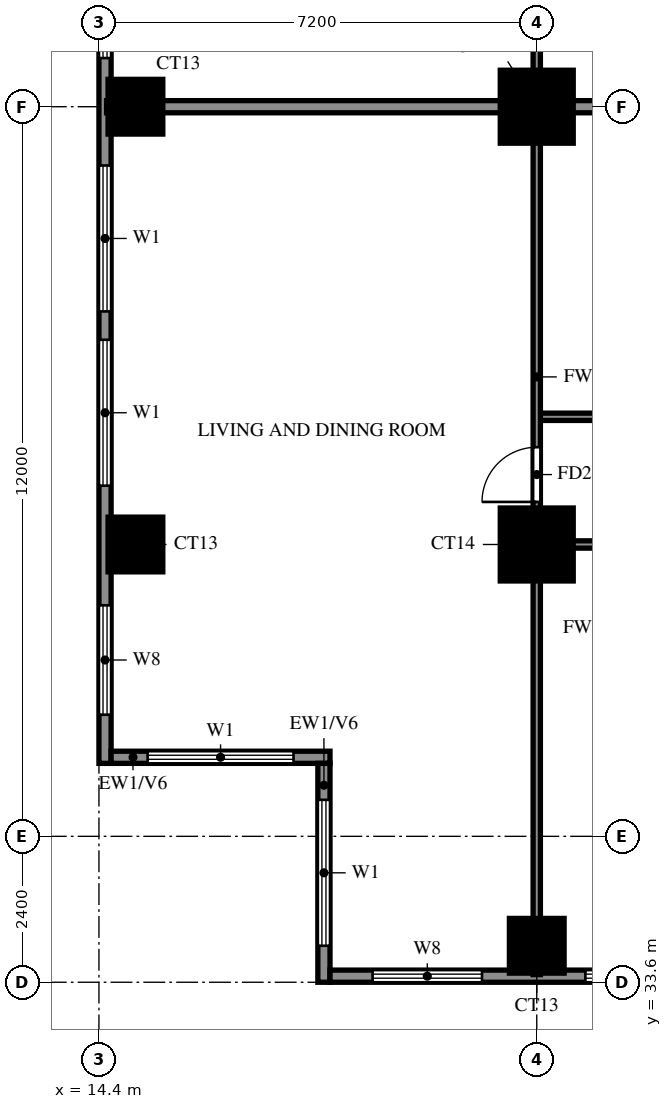
"""IFC4 building model, lengths in metres.
Left out: names, types, materials, properties, quantities, classifications, styles, units other than length and angle.
Written with IfcOpenShell. Run it as: python <this file> out.ifc"""

import sys

from ifc_helpers import new_model, si_unit, direction, frame, frame_2d, origin, origin_2d, place, context, subcontext, project, spatial, rectangle, extrude, source, transform, mapped, element, fill, save


model = new_model("IFC4")
c1 = context("Model", 3, precision=1e-05, world=origin(), true_north=direction((0.0, 1.0)))
c2 = subcontext(c1, "Body", "Model", "MODEL_VIEW")
j1 = project(units=[si_unit("LENGTHUNIT", "METRE"), si_unit("PLANEANGLEUNIT", "RADIAN")], contexts=[c1])
p1 = place(None, origin())
s1 = spatial("IfcSite", under=j1, at=p1, CompositionType="ELEMENT")
p2 = place(p1, origin())
s2 = spatial("IfcBuilding", under=s1, at=p2, CompositionType="ELEMENT")
p3 = place(p2, frame((0.0, 0.0, 104.0)))
s3 = spatial("IfcBuildingStorey", under=s2, at=p3, CompositionType="ELEMENT", Elevation=104.0)
m1 = source(origin(), c2, "Body", "SweptSolid", [
    extrude(rectangle(XDim=0.9, YDim=0.9, at=origin_2d()), origin(), (0.0, 0.0, 1.0), 3.1),
])
for number, where, z_axis, x_axis in (
    (1, (21.6, 34.2, 0.0), (0.0, 0.0, 1.0), (1.0, 0.0, 0.0)),
    (2, (15.0, 40.8, 0.0), (0.0, 0.0, 1.0), (1.0, 0.0, 0.0)),
):
    element("IfcColumn", number, at=place(p3, frame(where, z_axis=z_axis, x_axis=x_axis)), inside=s3, PredefinedType="COLUMN", context=c2, shape_type="MappedRepresentation", body=[
        mapped(m1, transform((0.0, 0.0, 0.0))),
    ])
m2 = source(origin(), c2, "Body", "SweptSolid", [
    extrude(rectangle(XDim=1.2, YDim=1.2, at=origin_2d()), origin(), (0.0, 0.0, 1.0), 3.1),
])
p4 = place(p3, frame((21.6, 40.8, 0.0), z_axis=(0.0, 0.0, 1.0), x_axis=(1.0, 0.0, 0.0)))
e3 = element("IfcColumn", 3, at=p4, inside=s3, PredefinedType="COLUMN", context=c2, shape_type="MappedRepresentation", body=[
    mapped(m2, transform((0.0, 0.0, 0.0))),
])
p5 = place(p3, frame((15.0, 48.0, 0.0), z_axis=(0.0, 0.0, 1.0), x_axis=(1.0, 0.0, 0.0)))
e4 = element("IfcColumn", 4, at=p5, inside=s3, PredefinedType="COLUMN", context=c2, shape_type="MappedRepresentation", body=[
    mapped(m1, transform((0.0, 0.0, 0.0))),
])
p6 = place(p3, frame((21.6, 48.0, 0.0), z_axis=(0.0, 0.0, 1.0), x_axis=(1.0, 0.0, 0.0)))
e5 = element("IfcColumn", 5, at=p6, inside=s3, PredefinedType="COLUMN", context=c2, shape_type="MappedRepresentation", body=[
    mapped(m2, transform((0.0, 0.0, 0.0))),
])
p7 = place(p3, frame((14.5, 76.6, 0.0), z_axis=(0.0, 0.0, 1.0), x_axis=(0.0, -1.0, 0.0)))
e6 = element("IfcWall", 6, at=p7, inside=s3, PredefinedType="SOLIDWALL", context=c2, shape_type="SweptSolid", body=[
    extrude(rectangle(XDim=39.4, YDim=0.2, at=frame_2d((19.7, 0.0))), origin(), (0.0, 0.0, 1.0), 3.1),
])
p8 = place(p7, frame((7.9, 0.0, 0.0)))
e7 = element("IfcOpeningElement", 7, at=p8, cuts=e6, PredefinedType="OPENING", context=c2, shape_type="SweptSolid", body=[
    extrude(rectangle(XDim=1.8, YDim=2.4, at=frame_2d((0.9, 1.2))), frame((0.0, 0.11, 0.0), z_axis=(0.0, -1.0, 0.0), x_axis=(1.0, 0.0, 0.0)), (0.0, 0.0, 1.0), 0.22),
])
p9 = place(p7, frame((29.567, 0.0, 0.6)))
e8 = element("IfcOpeningElement", 8, at=p9, cuts=e6, PredefinedType="OPENING", context=c2, shape_type="SweptSolid", body=[
    extrude(rectangle(XDim=2.4, YDim=2.4, at=frame_2d((1.2, 1.2))), frame((0.0, 0.11, 0.0), z_axis=(0.0, -1.0, 0.0), x_axis=(1.0, 0.0, 0.0)), (0.0, 0.0, 1.0), 0.22),
])
p10 = place(p7, frame((32.433, 0.0, 0.6)))
e9 = element("IfcOpeningElement", 9, at=p10, cuts=e6, PredefinedType="OPENING", context=c2, shape_type="SweptSolid", body=[
    extrude(rectangle(XDim=2.4, YDim=2.4, at=frame_2d((1.2, 1.2))), frame((0.0, 0.11, 0.0), z_axis=(0.0, -1.0, 0.0), x_axis=(1.0, 0.0, 0.0)), (0.0, 0.0, 1.0), 0.22),
])
p11 = place(p7, frame((36.8, 0.0, 0.6)))
e10 = element("IfcOpeningElement", 10, at=p11, cuts=e6, PredefinedType="OPENING", context=c2, shape_type="SweptSolid", body=[
    extrude(rectangle(XDim=1.8, YDim=2.4, at=frame_2d((0.9, 1.2))), frame((0.0, 0.11, 0.0), z_axis=(0.0, -1.0, 0.0), x_axis=(1.0, 0.0, 0.0)), (0.0, 0.0, 1.0), 0.22),
])
p12 = place(p7, frame((25.4, 0.0, 0.6)))
e11 = element("IfcOpeningElement", 11, at=p12, cuts=e6, PredefinedType="OPENING", context=c2, shape_type="SweptSolid", body=[
    extrude(rectangle(XDim=2.4, YDim=2.4, at=frame_2d((1.2, 1.2))), frame((0.0, 0.11, 0.0), z_axis=(0.0, -1.0, 0.0), x_axis=(1.0, 0.0, 0.0)), (0.0, 0.0, 1.0), 0.22),
])
p13 = place(p7, frame((22.95, 0.0, 1.5)))
e12 = element("IfcOpeningElement", 12, at=p13, cuts=e6, PredefinedType="OPENING", context=c2, shape_type="SweptSolid", body=[
    extrude(rectangle(XDim=0.9, YDim=0.9, at=frame_2d((0.45, 0.45))), frame((0.0, 0.11, 0.0), z_axis=(0.0, -1.0, 0.0), x_axis=(1.0, 0.0, 0.0)), (0.0, 0.0, 1.0), 0.22),
])
p14 = place(p7, frame((15.167, 0.0, 0.6)))
e13 = element("IfcOpeningElement", 13, at=p14, cuts=e6, PredefinedType="OPENING", context=c2, shape_type="SweptSolid", body=[
    extrude(rectangle(XDim=2.4, YDim=2.4, at=frame_2d((1.2, 1.2))), frame((0.0, 0.11, 0.0), z_axis=(0.0, -1.0, 0.0), x_axis=(1.0, 0.0, 0.0)), (0.0, 0.0, 1.0), 0.22),
])
p15 = place(p7, frame((18.033, 0.0, 0.6)))
e14 = element("IfcOpeningElement", 14, at=p15, cuts=e6, PredefinedType="OPENING", context=c2, shape_type="SweptSolid", body=[
    extrude(rectangle(XDim=2.4, YDim=2.4, at=frame_2d((1.2, 1.2))), frame((0.0, 0.11, 0.0), z_axis=(0.0, -1.0, 0.0), x_axis=(1.0, 0.0, 0.0)), (0.0, 0.0, 1.0), 0.22),
])
p16 = place(p7, frame((11.9, 0.0, 0.6)))
e15 = element("IfcOpeningElement", 15, at=p16, cuts=e6, PredefinedType="OPENING", context=c2, shape_type="SweptSolid", body=[
    extrude(rectangle(XDim=1.8, YDim=2.4, at=frame_2d((0.9, 1.2))), frame((0.0, 0.11, 0.0), z_axis=(0.0, -1.0, 0.0), x_axis=(1.0, 0.0, 0.0)), (0.0, 0.0, 1.0), 0.22),
])
p17 = place(p7, frame((3.55, 0.0, 1.5)))
e16 = element("IfcOpeningElement", 16, at=p17, cuts=e6, PredefinedType="OPENING", context=c2, shape_type="SweptSolid", body=[
    extrude(rectangle(XDim=0.9, YDim=0.9, at=frame_2d((0.45, 0.45))), frame((0.0, 0.11, 0.0), z_axis=(0.0, -1.0, 0.0), x_axis=(1.0, 0.0, 0.0)), (0.0, 0.0, 1.0), 0.22),
])
p18 = place(p7, frame((5.45, 0.0, 1.5)))
e17 = element("IfcOpeningElement", 17, at=p18, cuts=e6, PredefinedType="OPENING", context=c2, shape_type="SweptSolid", body=[
    extrude(rectangle(XDim=0.9, YDim=0.9, at=frame_2d((0.45, 0.45))), frame((0.0, 0.11, 0.0), z_axis=(0.0, -1.0, 0.0), x_axis=(1.0, 0.0, 0.0)), (0.0, 0.0, 1.0), 0.22),
])
p19 = place(p7, frame((0.6, 0.0, 0.6)))
e18 = element("IfcOpeningElement", 18, at=p19, cuts=e6, PredefinedType="OPENING", context=c2, shape_type="SweptSolid", body=[
    extrude(rectangle(XDim=2.4, YDim=2.4, at=frame_2d((1.2, 1.2))), frame((0.0, 0.11, 0.0), z_axis=(0.0, -1.0, 0.0), x_axis=(1.0, 0.0, 0.0)), (0.0, 0.0, 1.0), 0.22),
])
p20 = place(p3, frame((14.6, 37.3, 0.0), z_axis=(0.0, 0.0, 1.0), x_axis=(1.0, 0.0, 0.0)))
e19 = element("IfcWall", 19, at=p20, inside=s3, PredefinedType="SOLIDWALL", context=c2, shape_type="SweptSolid", body=[
    extrude(rectangle(XDim=3.6, YDim=0.2, at=frame_2d((1.8, 0.0))), origin(), (0.0, 0.0, 1.0), 3.1),
])
p21 = place(p20, frame((0.6, 0.0, 0.6)))
e20 = element("IfcOpeningElement", 20, at=p21, cuts=e19, PredefinedType="OPENING", context=c2, shape_type="SweptSolid", body=[
    extrude(rectangle(XDim=2.4, YDim=2.4, at=frame_2d((1.2, 1.2))), frame((0.0, 0.11, 0.0), z_axis=(0.0, -1.0, 0.0), x_axis=(1.0, 0.0, 0.0)), (0.0, 0.0, 1.0), 0.22),
])
p22 = place(p3, frame((18.1, 37.2, 0.0), z_axis=(0.0, 0.0, 1.0), x_axis=(0.0, -1.0, 0.0)))
e21 = element("IfcWall", 21, at=p22, inside=s3, PredefinedType="SOLIDWALL", context=c2, shape_type="SweptSolid", body=[
    extrude(rectangle(XDim=3.6, YDim=0.2, at=frame_2d((1.8, 0.0))), origin(), (0.0, 0.0, 1.0), 3.1),
])
p23 = place(p22, frame((0.6, 0.0, 0.6)))
e22 = element("IfcOpeningElement", 22, at=p23, cuts=e21, PredefinedType="OPENING", context=c2, shape_type="SweptSolid", body=[
    extrude(rectangle(XDim=2.4, YDim=2.4, at=frame_2d((1.2, 1.2))), frame((0.0, 0.11, 0.0), z_axis=(0.0, -1.0, 0.0), x_axis=(1.0, 0.0, 0.0)), (0.0, 0.0, 1.0), 0.22),
])
p24 = place(p3, frame((18.2, 33.7, 0.0), z_axis=(0.0, 0.0, 1.0), x_axis=(1.0, 0.0, 0.0)))
e23 = element("IfcWall", 23, at=p24, inside=s3, PredefinedType="SOLIDWALL", context=c2, shape_type="SweptSolid", body=[
    extrude(rectangle(XDim=10.6, YDim=0.2, at=frame_2d((5.3, 0.0))), origin(), (0.0, 0.0, 1.0), 3.1),
])
p25 = place(p24, frame((0.7, 0.0, 0.6)))
e24 = element("IfcOpeningElement", 24, at=p25, cuts=e23, PredefinedType="OPENING", context=c2, shape_type="SweptSolid", body=[
    extrude(rectangle(XDim=1.8, YDim=2.4, at=frame_2d((0.9, 1.2))), frame((0.0, 0.11, 0.0), z_axis=(0.0, -1.0, 0.0), x_axis=(1.0, 0.0, 0.0)), (0.0, 0.0, 1.0), 0.22),
])
p26 = place(p24, frame((4.2, 0.0, 0.6)))
e25 = element("IfcOpeningElement", 25, at=p26, cuts=e23, PredefinedType="OPENING", context=c2, shape_type="SweptSolid", body=[
    extrude(rectangle(XDim=2.4, YDim=2.4, at=frame_2d((1.2, 1.2))), frame((0.0, 0.11, 0.0), z_axis=(0.0, -1.0, 0.0), x_axis=(1.0, 0.0, 0.0)), (0.0, 0.0, 1.0), 0.22),
])
p27 = place(p24, frame((8.15, 0.0, 1.5)))
e26 = element("IfcOpeningElement", 26, at=p27, cuts=e23, PredefinedType="OPENING", context=c2, shape_type="SweptSolid", body=[
    extrude(rectangle(XDim=0.9, YDim=0.9, at=frame_2d((0.45, 0.45))), frame((0.0, 0.11, 0.0), z_axis=(0.0, -1.0, 0.0), x_axis=(1.0, 0.0, 0.0)), (0.0, 0.0, 1.0), 0.22),
])
p28 = place(p3, frame((14.525, 48.0, 0.0), z_axis=(0.0, 0.0, 1.0), x_axis=(1.0, 0.0, 0.0)))
e27 = element("IfcWall", 27, at=p28, inside=s3, PredefinedType="SOLIDWALL", context=c2, shape_type="SweptSolid", body=[
    extrude(rectangle(XDim=19.075, YDim=0.2, at=frame_2d((9.538, 0.0))), origin(), (0.0, 0.0, 1.0), 3.1),
])
p29 = place(p3, frame((21.6, 40.8, 0.0), z_axis=(0.0, 0.0, 1.0), x_axis=(1.0, 0.0, 0.0)))
e28 = element("IfcWall", 28, at=p29, inside=s3, PredefinedType="PARTITIONING", context=c2, shape_type="SweptSolid", body=[
    extrude(rectangle(XDim=3.6, YDim=0.12, at=frame_2d((1.8, 0.0))), origin(), (0.0, 0.0, 1.0), 3.1),
])
p30 = place(p29, frame((1.35, 0.0, 0.0)))
e29 = element("IfcOpeningElement", 29, at=p30, cuts=e28, PredefinedType="OPENING", context=c2, shape_type="SweptSolid", body=[
    extrude(rectangle(XDim=0.9, YDim=2.1, at=frame_2d((0.45, 1.05))), frame((0.0, 0.07, 0.0), z_axis=(0.0, -1.0, 0.0), x_axis=(1.0, 0.0, 0.0)), (0.0, 0.0, 1.0), 0.14),
])
p31 = place(p3, frame((21.6, 42.9, 0.0), z_axis=(0.0, 0.0, 1.0), x_axis=(1.0, 0.0, 0.0)))
e30 = element("IfcWall", 30, at=p31, inside=s3, PredefinedType="PARTITIONING", context=c2, shape_type="SweptSolid", body=[
    extrude(rectangle(XDim=15.6, YDim=0.12, at=frame_2d((7.8, 0.0))), origin(), (0.0, 0.0, 1.0), 3.1),
])
p32 = place(p31, frame((2.1, 0.0, 0.0)))
e31 = element("IfcOpeningElement", 31, at=p32, cuts=e30, PredefinedType="OPENING", context=c2, shape_type="SweptSolid", body=[
    extrude(rectangle(XDim=0.9, YDim=2.1, at=frame_2d((0.45, 1.05))), frame((0.0, 0.07, 0.0), z_axis=(0.0, -1.0, 0.0), x_axis=(1.0, 0.0, 0.0)), (0.0, 0.0, 1.0), 0.14),
])
p33 = place(p31, frame((5.8, 0.0, 0.0)))
e32 = element("IfcOpeningElement", 32, at=p33, cuts=e30, PredefinedType="OPENING", context=c2, shape_type="SweptSolid", body=[
    extrude(rectangle(XDim=0.8, YDim=2.1, at=frame_2d((0.4, 1.05))), frame((0.0, 0.07, 0.0), z_axis=(0.0, -1.0, 0.0), x_axis=(1.0, 0.0, 0.0)), (0.0, 0.0, 1.0), 0.14),
])
p34 = place(p31, frame((9.2, 0.0, 0.0)))
e33 = element("IfcOpeningElement", 33, at=p34, cuts=e30, PredefinedType="OPENING", context=c2, shape_type="SweptSolid", body=[
    extrude(rectangle(XDim=0.9, YDim=2.1, at=frame_2d((0.45, 1.05))), frame((0.0, 0.07, 0.0), z_axis=(0.0, -1.0, 0.0), x_axis=(1.0, 0.0, 0.0)), (0.0, 0.0, 1.0), 0.14),
])
p35 = place(p31, frame((13.35, 0.0, 0.0)))
e34 = element("IfcOpeningElement", 34, at=p35, cuts=e30, PredefinedType="OPENING", context=c2, shape_type="SweptSolid", body=[
    extrude(rectangle(XDim=0.9, YDim=2.1, at=frame_2d((0.45, 1.05))), frame((0.0, 0.07, 0.0), z_axis=(0.0, -1.0, 0.0), x_axis=(1.0, 0.0, 0.0)), (0.0, 0.0, 1.0), 0.14),
])
p36 = place(p3, frame((21.6, 33.725, 0.0), z_axis=(0.0, 0.0, 1.0), x_axis=(0.0, 1.0, 0.0)))
e35 = element("IfcWall", 35, at=p36, inside=s3, PredefinedType="PARTITIONING", context=c2, shape_type="SweptSolid", body=[
    extrude(rectangle(XDim=17.875, YDim=0.12, at=frame_2d((8.938, 0.0))), origin(), (0.0, 0.0, 1.0), 3.1),
])
p37 = place(p36, frame((7.775, 0.0, 0.0)))
e36 = element("IfcOpeningElement", 36, at=p37, cuts=e35, PredefinedType="OPENING", context=c2, shape_type="SweptSolid", body=[
    extrude(rectangle(XDim=0.9, YDim=2.1, at=frame_2d((0.45, 1.05))), frame((0.0, 0.07, 0.0), z_axis=(0.0, -1.0, 0.0), x_axis=(1.0, 0.0, 0.0)), (0.0, 0.0, 1.0), 0.14),
])
p38 = place(p36, frame((15.625, 0.0, 0.0)))
e37 = element("IfcOpeningElement", 37, at=p38, cuts=e35, PredefinedType="OPENING", context=c2, shape_type="SweptSolid", body=[
    extrude(rectangle(XDim=0.9, YDim=2.1, at=frame_2d((0.45, 1.05))), frame((0.0, 0.07, 0.0), z_axis=(0.0, -1.0, 0.0), x_axis=(1.0, 0.0, 0.0)), (0.0, 0.0, 1.0), 0.14),
])
p39 = place(p9, origin())
e38 = element("IfcWindow", 38, at=p39, inside=s3, PartitioningType="DOUBLE_PANEL_VERTICAL", PredefinedType="WINDOW", context=c2, shape_type="SweptSolid", body=[
    extrude(rectangle(XDim=2.4, YDim=2.4, at=frame_2d((1.2, 1.2))), frame((0.0, 0.03, 0.0), z_axis=(0.0, -1.0, 0.0), x_axis=(1.0, 0.0, 0.0)), (0.0, 0.0, 1.0), 0.06),
])
fill(e8, e38)
p40 = place(p10, origin())
e39 = element("IfcWindow", 39, at=p40, inside=s3, PartitioningType="DOUBLE_PANEL_VERTICAL", PredefinedType="WINDOW", context=c2, shape_type="SweptSolid", body=[
    extrude(rectangle(XDim=2.4, YDim=2.4, at=frame_2d((1.2, 1.2))), frame((0.0, 0.03, 0.0), z_axis=(0.0, -1.0, 0.0), x_axis=(1.0, 0.0, 0.0)), (0.0, 0.0, 1.0), 0.06),
])
fill(e9, e39)
p41 = place(p11, origin())
e40 = element("IfcWindow", 40, at=p41, inside=s3, PartitioningType="DOUBLE_PANEL_VERTICAL", PredefinedType="WINDOW", context=c2, shape_type="SweptSolid", body=[
    extrude(rectangle(XDim=1.8, YDim=2.4, at=frame_2d((0.9, 1.2))), frame((0.0, 0.03, 0.0), z_axis=(0.0, -1.0, 0.0), x_axis=(1.0, 0.0, 0.0)), (0.0, 0.0, 1.0), 0.06),
])
fill(e10, e40)
p42 = place(p12, origin())
e41 = element("IfcWindow", 41, at=p42, inside=s3, PartitioningType="DOUBLE_PANEL_VERTICAL", PredefinedType="WINDOW", context=c2, shape_type="SweptSolid", body=[
    extrude(rectangle(XDim=2.4, YDim=2.4, at=frame_2d((1.2, 1.2))), frame((0.0, 0.03, 0.0), z_axis=(0.0, -1.0, 0.0), x_axis=(1.0, 0.0, 0.0)), (0.0, 0.0, 1.0), 0.06),
])
fill(e11, e41)
p43 = place(p21, origin())
e42 = element("IfcWindow", 42, at=p43, inside=s3, PartitioningType="DOUBLE_PANEL_VERTICAL", PredefinedType="WINDOW", context=c2, shape_type="SweptSolid", body=[
    extrude(rectangle(XDim=2.4, YDim=2.4, at=frame_2d((1.2, 1.2))), frame((0.0, 0.03, 0.0), z_axis=(0.0, -1.0, 0.0), x_axis=(1.0, 0.0, 0.0)), (0.0, 0.0, 1.0), 0.06),
])
fill(e20, e42)
p44 = place(p23, origin())
e43 = element("IfcWindow", 43, at=p44, inside=s3, PartitioningType="DOUBLE_PANEL_VERTICAL", PredefinedType="WINDOW", context=c2, shape_type="SweptSolid", body=[
    extrude(rectangle(XDim=2.4, YDim=2.4, at=frame_2d((1.2, 1.2))), frame((0.0, 0.03, 0.0), z_axis=(0.0, -1.0, 0.0), x_axis=(1.0, 0.0, 0.0)), (0.0, 0.0, 1.0), 0.06),
])
fill(e22, e43)
p45 = place(p25, origin())
e44 = element("IfcWindow", 44, at=p45, inside=s3, PartitioningType="DOUBLE_PANEL_VERTICAL", PredefinedType="WINDOW", context=c2, shape_type="SweptSolid", body=[
    extrude(rectangle(XDim=1.8, YDim=2.4, at=frame_2d((0.9, 1.2))), frame((0.0, 0.03, 0.0), z_axis=(0.0, -1.0, 0.0), x_axis=(1.0, 0.0, 0.0)), (0.0, 0.0, 1.0), 0.06),
])
fill(e24, e44)
p46 = place(p26, origin())
e45 = element("IfcWindow", 45, at=p46, inside=s3, PartitioningType="DOUBLE_PANEL_VERTICAL", PredefinedType="WINDOW", context=c2, shape_type="SweptSolid", body=[
    extrude(rectangle(XDim=2.4, YDim=2.4, at=frame_2d((1.2, 1.2))), frame((0.0, 0.03, 0.0), z_axis=(0.0, -1.0, 0.0), x_axis=(1.0, 0.0, 0.0)), (0.0, 0.0, 1.0), 0.06),
])
fill(e25, e45)
p47 = place(p37, origin())
e46 = element("IfcDoor", 46, at=p47, inside=s3, OperationType="SINGLE_SWING_RIGHT", PredefinedType="DOOR", context=c2, shape_type="SweptSolid", body=[
    extrude(rectangle(XDim=0.9, YDim=2.1, at=frame_2d((0.45, 1.05))), frame((0.0, 0.025, 0.0), z_axis=(0.0, -1.0, 0.0), x_axis=(1.0, 0.0, 0.0)), (0.0, 0.0, 1.0), 0.05),
])
fill(e36, e46)
save(model, sys.argv[1])
